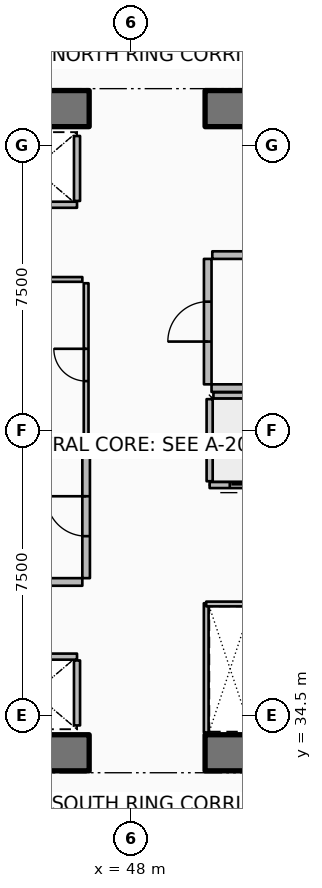
"""IFC4 building model, lengths in metres.
Left out: names, types, materials, properties, quantities, classifications, styles, units other than length and angle.
Written with IfcOpenShell. Run it as: python <this file> out.ifc"""

import sys

from ifc_helpers import new_model, si_unit, direction, frame, frame_2d, origin, place, context, subcontext, project, spatial, rectangle, extrude, element, fill, save


model = new_model("IFC4")
c1 = context("Model", 3, precision=1e-05, world=origin(), true_north=direction((0.0, 1.0)))
c2 = subcontext(c1, "Body", "Model", "MODEL_VIEW")
j1 = project(units=[si_unit("LENGTHUNIT", "METRE"), si_unit("PLANEANGLEUNIT", "RADIAN")], contexts=[c1])
p1 = place(None, origin())
s1 = spatial("IfcSite", under=j1, at=p1, CompositionType="ELEMENT")
p2 = place(p1, origin())
s2 = spatial("IfcBuilding", under=s1, at=p2, CompositionType="ELEMENT")
p3 = place(p2, frame((0.0, 0.0, 56.4)))
s3 = spatial("IfcBuildingStorey", under=s2, at=p3, CompositionType="ELEMENT", Elevation=56.4)
p4 = place(p3, frame((36.85, 33.525, 0.0), z_axis=(0.0, 0.0, 1.0), x_axis=(1.0, 0.0, 0.0)))
e1 = element("IfcWall", 1, at=p4, inside=s3, PredefinedType="SHEAR", context=c2, shape_type="SweptSolid", body=[
    extrude(rectangle(XDim=10.05, YDim=0.95, at=frame_2d((5.025, 0.0))), origin(), (0.0, 0.0, 1.0), 3.75),
])
p5 = place(p3, frame((49.95, 33.525, 0.0), z_axis=(0.0, 0.0, 1.0), x_axis=(1.0, 0.0, 0.0)))
e2 = element("IfcWall", 2, at=p5, inside=s3, PredefinedType="SHEAR", context=c2, shape_type="SweptSolid", body=[
    extrude(rectangle(XDim=10.05, YDim=0.95, at=frame_2d((5.025, 0.0))), origin(), (0.0, 0.0, 1.0), 3.75),
])
p6 = place(p3, frame((36.85, 50.475, 0.0), z_axis=(0.0, 0.0, 1.0), x_axis=(1.0, 0.0, 0.0)))
e3 = element("IfcWall", 3, at=p6, inside=s3, PredefinedType="SHEAR", context=c2, shape_type="SweptSolid", body=[
    extrude(rectangle(XDim=10.05, YDim=0.95, at=frame_2d((5.025, 0.0))), origin(), (0.0, 0.0, 1.0), 3.75),
])
p7 = place(p3, frame((49.95, 50.475, 0.0), z_axis=(0.0, 0.0, 1.0), x_axis=(1.0, 0.0, 0.0)))
e4 = element("IfcWall", 4, at=p7, inside=s3, PredefinedType="SHEAR", context=c2, shape_type="SweptSolid", body=[
    extrude(rectangle(XDim=10.05, YDim=0.95, at=frame_2d((5.025, 0.0))), origin(), (0.0, 0.0, 1.0), 3.75),
])
p8 = place(p3, frame((46.58, 47.945, 0.0), z_axis=(0.0, 0.0, 1.0), x_axis=(-1.0, 0.0, 0.0)))
e5 = element("IfcWall", 5, at=p8, inside=s3, PredefinedType="PARTITIONING", context=c2, shape_type="SweptSolid", body=[
    extrude(rectangle(XDim=2.26, YDim=0.16, at=frame_2d((1.13, 0.0))), origin(), (0.0, 0.0, 1.0), 3.5),
])
p9 = place(p3, frame((46.58, 48.045, 0.0), z_axis=(0.0, 0.0, 1.0), x_axis=(0.0, 1.0, 0.0)))
e6 = element("IfcWall", 6, at=p9, inside=s3, PredefinedType="PARTITIONING", context=c2, shape_type="SweptSolid", body=[
    extrude(rectangle(XDim=1.71, YDim=0.16, at=frame_2d((0.855, 0.0))), origin(), (0.0, 0.0, 1.0), 3.5),
])
p10 = place(p3, frame((44.32, 36.055, 0.0), z_axis=(0.0, 0.0, 1.0), x_axis=(1.0, 0.0, 0.0)))
e7 = element("IfcWall", 7, at=p10, inside=s3, PredefinedType="PARTITIONING", context=c2, shape_type="SweptSolid", body=[
    extrude(rectangle(XDim=2.26, YDim=0.16, at=frame_2d((1.13, 0.0))), origin(), (0.0, 0.0, 1.0), 3.5),
])
p11 = place(p3, frame((46.58, 34.245, 0.0), z_axis=(0.0, 0.0, 1.0), x_axis=(0.0, 1.0, 0.0)))
e8 = element("IfcWall", 8, at=p11, inside=s3, PredefinedType="PARTITIONING", context=c2, shape_type="SweptSolid", body=[
    extrude(rectangle(XDim=1.71, YDim=0.16, at=frame_2d((0.855, 0.0))), origin(), (0.0, 0.0, 1.0), 3.5),
])
p12 = place(p3, frame((52.23, 40.57, 0.0), z_axis=(0.0, 0.0, 1.0), x_axis=(-1.0, 0.0, 0.0)))
e9 = element("IfcWall", 9, at=p12, inside=s3, PredefinedType="PARTITIONING", context=c2, shape_type="SweptSolid", body=[
    extrude(rectangle(XDim=2.16, YDim=0.16, at=frame_2d((1.08, 0.0))), origin(), (0.0, 0.0, 1.0), 3.5),
])
p13 = place(p12, frame((0.53, 0.0, 0.0)))
e10 = element("IfcOpeningElement", 10, at=p13, cuts=e9, PredefinedType="OPENING", context=c2, shape_type="SweptSolid", body=[
    extrude(rectangle(XDim=1.1, YDim=2.1, at=frame_2d((0.55, 1.05))), frame((0.0, 0.09, 0.0), z_axis=(0.0, -1.0, 0.0), x_axis=(1.0, 0.0, 0.0)), (0.0, 0.0, 1.0), 0.18),
])
p14 = place(p3, frame((50.07, 40.67, 0.0), z_axis=(0.0, 0.0, 1.0), x_axis=(0.0, 1.0, 0.0)))
e11 = element("IfcWall", 11, at=p14, inside=s3, PredefinedType="PARTITIONING", context=c2, shape_type="SweptSolid", body=[
    extrude(rectangle(XDim=2.16, YDim=0.16, at=frame_2d((1.08, 0.0))), origin(), (0.0, 0.0, 1.0), 3.5),
])
p15 = place(p3, frame((50.17, 42.93, 0.0), z_axis=(0.0, 0.0, 1.0), x_axis=(1.0, 0.0, 0.0)))
e12 = element("IfcWall", 12, at=p15, inside=s3, PredefinedType="PARTITIONING", context=c2, shape_type="SweptSolid", body=[
    extrude(rectangle(XDim=1.96, YDim=0.16, at=frame_2d((0.98, 0.0))), origin(), (0.0, 0.0, 1.0), 3.5),
])
p16 = place(p3, frame((41.35, 38.02, 0.0), z_axis=(0.0, 0.0, 1.0), x_axis=(1.0, 0.0, 0.0)))
e13 = element("IfcWall", 13, at=p16, inside=s3, PredefinedType="PARTITIONING", context=c2, shape_type="SweptSolid", body=[
    extrude(rectangle(XDim=5.37, YDim=0.2, at=frame_2d((2.685, 0.0))), origin(), (0.0, 0.0, 1.0), 3.5),
])
p17 = place(p3, frame((43.92, 41.48, 0.0), z_axis=(0.0, 0.0, 1.0), x_axis=(1.0, 0.0, 0.0)))
e14 = element("IfcWall", 14, at=p17, inside=s3, PredefinedType="PARTITIONING", context=c2, shape_type="SweptSolid", body=[
    extrude(rectangle(XDim=2.8, YDim=0.2, at=frame_2d((1.4, 0.0))), origin(), (0.0, 0.0, 1.0), 3.5),
])
p18 = place(p3, frame((46.82, 38.12, 0.0), z_axis=(0.0, 0.0, 1.0), x_axis=(0.0, 1.0, 0.0)))
e15 = element("IfcWall", 15, at=p18, inside=s3, PredefinedType="PARTITIONING", context=c2, shape_type="SweptSolid", body=[
    extrude(rectangle(XDim=3.26, YDim=0.2, at=frame_2d((1.63, 0.0))), origin(), (0.0, 0.0, 1.0), 3.5),
])
p19 = place(p18, frame((1.105, 0.0, 0.0)))
e16 = element("IfcOpeningElement", 16, at=p19, cuts=e15, PredefinedType="OPENING", context=c2, shape_type="SweptSolid", body=[
    extrude(rectangle(XDim=1.05, YDim=2.1, at=frame_2d((0.525, 1.05))), frame((0.0, 0.11, 0.0), z_axis=(0.0, -1.0, 0.0), x_axis=(1.0, 0.0, 0.0)), (0.0, 0.0, 1.0), 0.22),
])
p20 = place(p3, frame((50.12, 43.12, 0.0), z_axis=(0.0, 0.0, 1.0), x_axis=(1.0, 0.0, 0.0)))
e17 = element("IfcWall", 17, at=p20, inside=s3, PredefinedType="PARTITIONING", context=c2, shape_type="SweptSolid", body=[
    extrude(rectangle(XDim=8.88, YDim=0.2, at=frame_2d((4.44, 0.0))), origin(), (0.0, 0.0, 1.0), 3.5),
])
p21 = place(p3, frame((50.14, 46.62, 0.0), z_axis=(0.0, 0.0, 1.0), x_axis=(1.0, 0.0, 0.0)))
e18 = element("IfcWall", 18, at=p21, inside=s3, PredefinedType="PARTITIONING", context=c2, shape_type="SweptSolid", body=[
    extrude(rectangle(XDim=1.02, YDim=0.2, at=frame_2d((0.51, 0.0))), origin(), (0.0, 0.0, 1.0), 3.5),
])
p22 = place(p3, frame((50.02, 43.22, 0.0), z_axis=(0.0, 0.0, 1.0), x_axis=(0.0, 1.0, 0.0)))
e19 = element("IfcWall", 19, at=p22, inside=s3, PredefinedType="PARTITIONING", context=c2, shape_type="SweptSolid", body=[
    extrude(rectangle(XDim=3.3, YDim=0.2, at=frame_2d((1.65, 0.0))), origin(), (0.0, 0.0, 1.0), 3.5),
])
p23 = place(p22, frame((1.125, 0.0, 0.0)))
e20 = element("IfcOpeningElement", 20, at=p23, cuts=e19, PredefinedType="OPENING", context=c2, shape_type="SweptSolid", body=[
    extrude(rectangle(XDim=1.05, YDim=2.1, at=frame_2d((0.525, 1.05))), frame((0.0, 0.11, 0.0), z_axis=(0.0, -1.0, 0.0), x_axis=(1.0, 0.0, 0.0)), (0.0, 0.0, 1.0), 0.22),
])
p24 = place(p3, frame((41.36, 45.98, 0.0), z_axis=(0.0, 0.0, 1.0), x_axis=(1.0, 0.0, 0.0)))
e21 = element("IfcWall", 21, at=p24, inside=s3, PredefinedType="PARTITIONING", context=c2, shape_type="SweptSolid", body=[
    extrude(rectangle(XDim=5.36, YDim=0.125, at=frame_2d((2.68, 0.0))), origin(), (0.0, 0.0, 1.0), 2.94),
])
p25 = place(p3, frame((49.98, 34.06, 0.0), z_axis=(0.0, 0.0, 1.0), x_axis=(0.0, 1.0, 0.0)))
e22 = element("IfcWall", 22, at=p25, inside=s3, PredefinedType="PARTITIONING", context=c2, shape_type="SweptSolid", body=[
    extrude(rectangle(XDim=3.4, YDim=0.125, at=frame_2d((1.7, 0.0))), origin(), (0.0, 0.0, 1.0), 2.94),
])
p26 = place(p3, frame((49.98, 37.44, 0.0), z_axis=(0.0, 0.0, 1.0), x_axis=(1.0, 0.0, 0.0)))
e23 = element("IfcWall", 23, at=p26, inside=s3, PredefinedType="PARTITIONING", context=c2, shape_type="SweptSolid", body=[
    extrude(rectangle(XDim=1.26, YDim=0.125, at=frame_2d((0.63, 0.0))), origin(), (0.0, 0.0, 1.0), 2.94),
])
p27 = place(p3, frame((46.82, 41.58, 0.0), z_axis=(0.0, 0.0, 1.0), x_axis=(0.0, 1.0, 0.0)))
e24 = element("IfcWall", 24, at=p27, inside=s3, PredefinedType="PARTITIONING", context=c2, shape_type="SweptSolid", body=[
    extrude(rectangle(XDim=4.3, YDim=0.125, at=frame_2d((2.15, 0.0))), origin(), (0.0, 0.0, 1.0), 2.94),
])
p28 = place(p27, frame((1.725, 0.0, 0.0)))
e25 = element("IfcOpeningElement", 25, at=p28, cuts=e24, PredefinedType="OPENING", context=c2, shape_type="SweptSolid", body=[
    extrude(rectangle(XDim=0.85, YDim=2.06, at=frame_2d((0.425, 1.03))), frame((0.0, 0.073, 0.0), z_axis=(0.0, -1.0, 0.0), x_axis=(1.0, 0.0, 0.0)), (0.0, 0.0, 1.0), 0.145),
])
p29 = place(p13, origin())
e26 = element("IfcDoor", 26, at=p29, inside=s3, OperationType="DOUBLE_DOOR_SLIDING", PredefinedType="DOOR", context=c2, shape_type="SweptSolid", body=[
    extrude(rectangle(XDim=1.1, YDim=2.1, at=frame_2d((0.55, 1.05))), frame((0.0, 0.025, 0.0), z_axis=(0.0, -1.0, 0.0), x_axis=(1.0, 0.0, 0.0)), (0.0, 0.0, 1.0), 0.05),
])
fill(e10, e26)
p30 = place(p19, origin())
e27 = element("IfcDoor", 27, at=p30, inside=s3, OperationType="SINGLE_SWING_RIGHT", PredefinedType="DOOR", context=c2, shape_type="SweptSolid", body=[
    extrude(rectangle(XDim=1.05, YDim=2.1, at=frame_2d((0.525, 1.05))), frame((0.0, 0.025, 0.0), z_axis=(0.0, -1.0, 0.0), x_axis=(1.0, 0.0, 0.0)), (0.0, 0.0, 1.0), 0.05),
])
fill(e16, e27)
p31 = place(p23, origin())
e28 = element("IfcDoor", 28, at=p31, inside=s3, OperationType="SINGLE_SWING_LEFT", PredefinedType="DOOR", context=c2, shape_type="SweptSolid", body=[
    extrude(rectangle(XDim=1.05, YDim=2.1, at=frame_2d((0.525, 1.05))), frame((0.0, 0.025, 0.0), z_axis=(0.0, -1.0, 0.0), x_axis=(1.0, 0.0, 0.0)), (0.0, 0.0, 1.0), 0.05),
])
fill(e20, e28)
p32 = place(p28, origin())
e29 = element("IfcDoor", 29, at=p32, inside=s3, OperationType="SINGLE_SWING_RIGHT", PredefinedType="DOOR", context=c2, shape_type="SweptSolid", body=[
    extrude(rectangle(XDim=0.85, YDim=2.06, at=frame_2d((0.425, 1.03))), frame((0.0, 0.025, 0.0), z_axis=(0.0, -1.0, 0.0), x_axis=(1.0, 0.0, 0.0)), (0.0, 0.0, 1.0), 0.05),
])
fill(e25, e29)
save(model, sys.argv[1])
